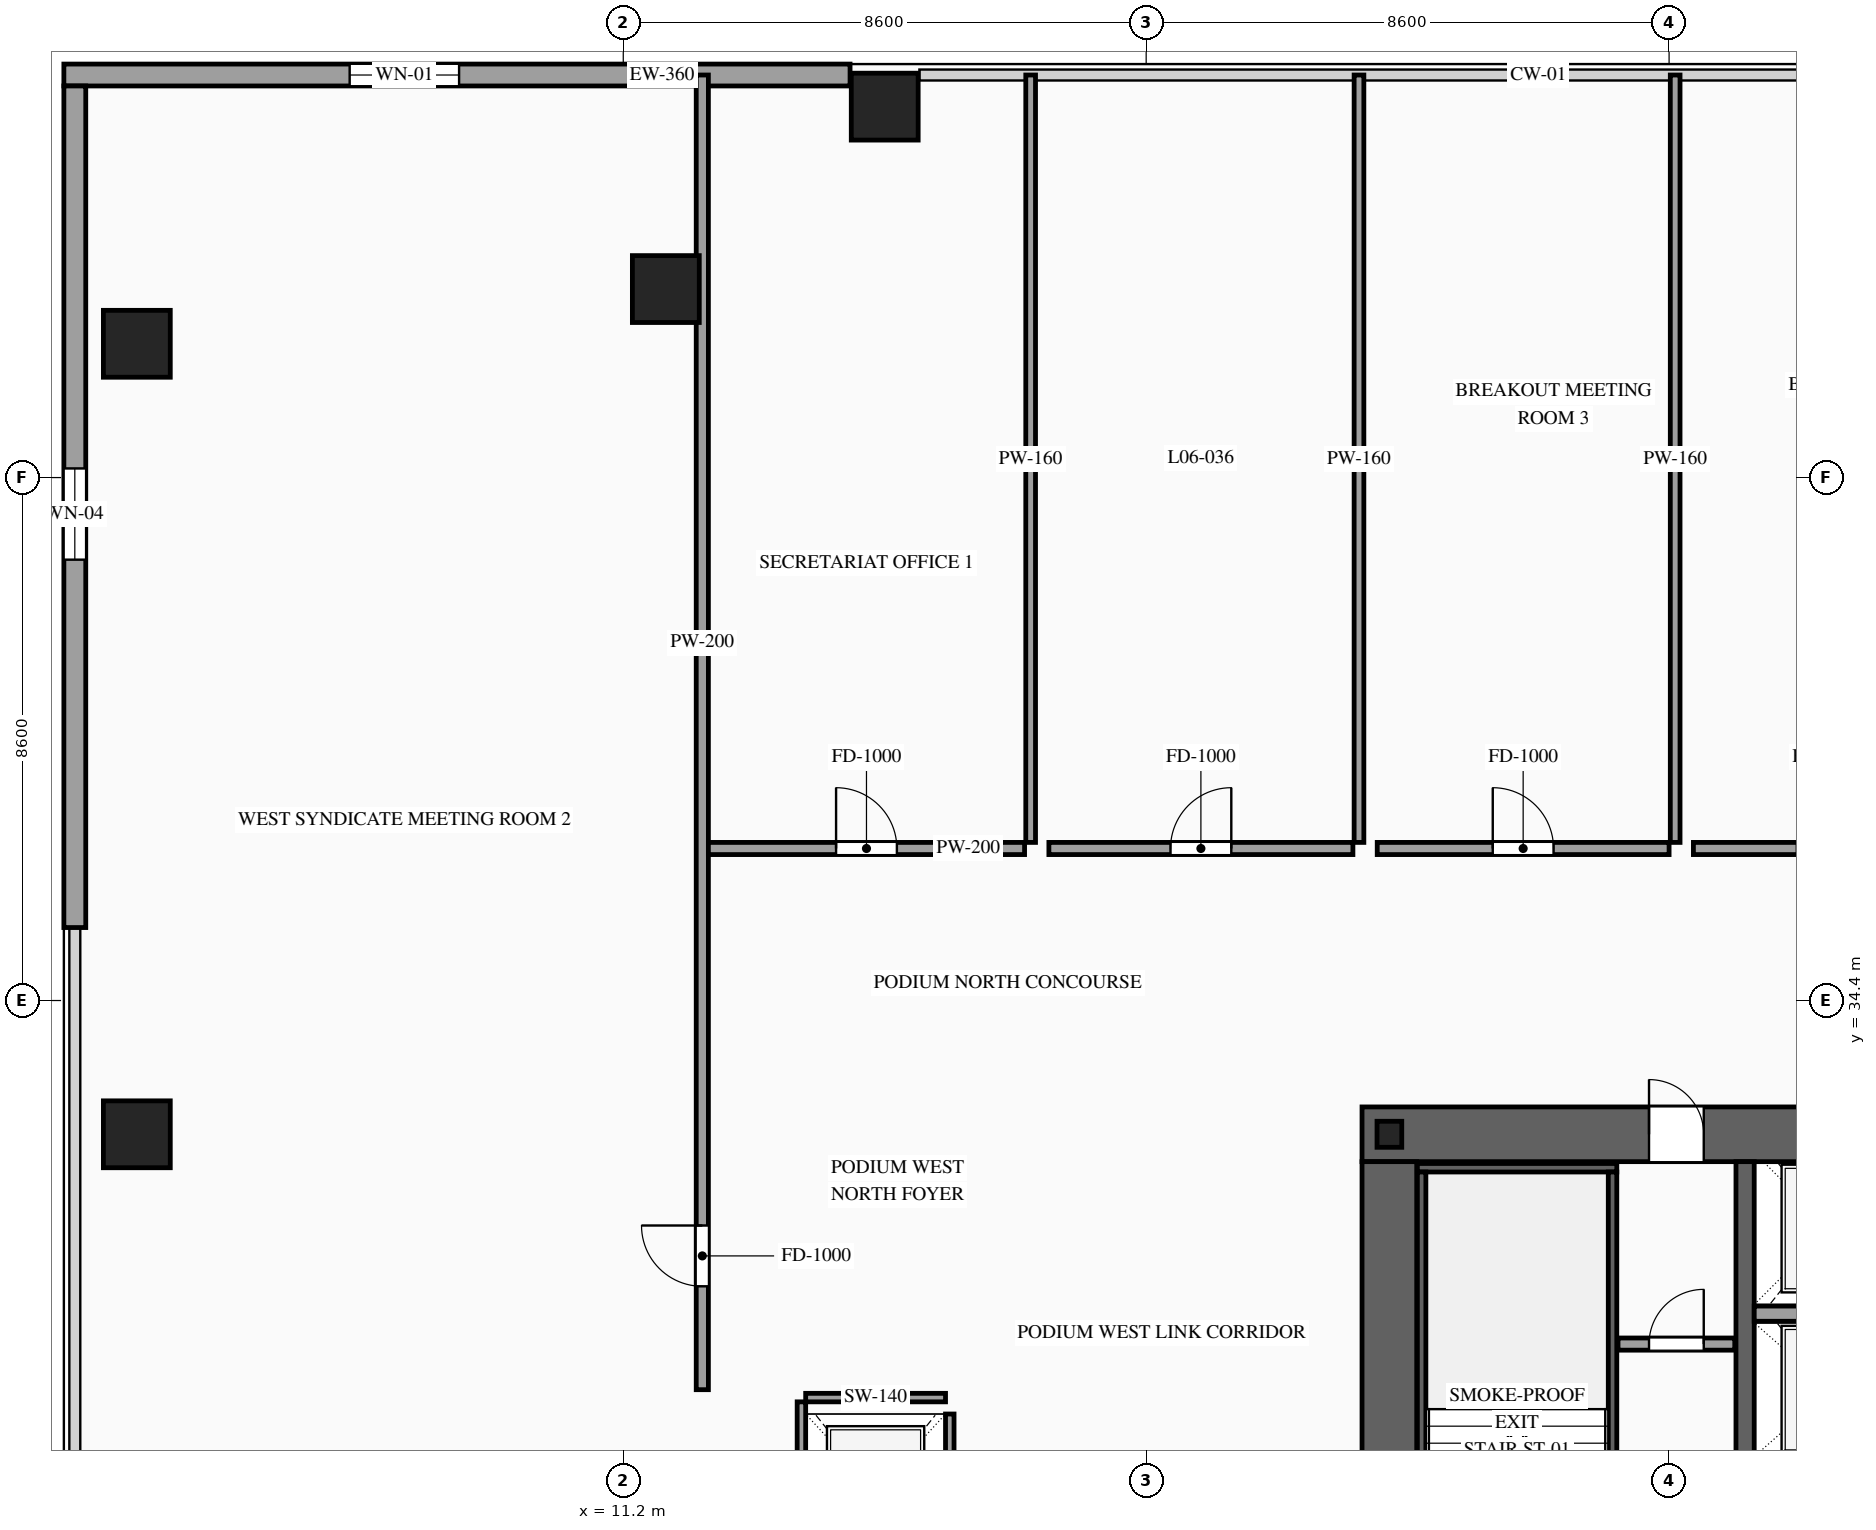
"""IFC4 building model, lengths in metres.
Left out: names, types, materials, properties, quantities, classifications, styles, units other than length and angle.
Written with IfcOpenShell. Run it as: python <this file> out.ifc"""

import sys

from ifc_helpers import new_model, si_unit, direction, frame, frame_2d, origin, origin_2d, place, context, subcontext, project, spatial, rectangle, i_section, extrude, source, transform, mapped, element, fill, save


model = new_model("IFC4")
c1 = context("Model", 3, precision=1e-05, world=origin(), true_north=direction((0.0, 1.0)))
c2 = subcontext(c1, "Body", "Model", "MODEL_VIEW")
j1 = project(units=[si_unit("LENGTHUNIT", "METRE"), si_unit("PLANEANGLEUNIT", "RADIAN")], contexts=[c1])
p1 = place(None, origin())
s1 = spatial("IfcSite", under=j1, at=p1, CompositionType="ELEMENT")
p2 = place(p1, origin())
s2 = spatial("IfcBuilding", under=s1, at=p2, CompositionType="ELEMENT")
p3 = place(p2, frame((0.0, 0.0, 25.8)))
s3 = spatial("IfcBuildingStorey", under=s2, at=p3, CompositionType="ELEMENT", Elevation=25.8)
p4 = place(p3, frame((23.35, 32.2, 0.0), z_axis=(0.0, 0.0, 1.0), x_axis=(1.0, 0.0, 0.0)))
e1 = element("IfcWall", 1, at=p4, inside=s3, PredefinedType="SHEAR", context=c2, shape_type="SweptSolid", body=[
    extrude(rectangle(XDim=27.3, YDim=0.9, at=frame_2d((13.65, 0.0))), origin(), (0.0, 0.0, 1.0), 4.8),
])
p5 = place(p4, frame((4.72, 0.0, 0.0)))
e2 = element("IfcOpeningElement", 2, at=p5, cuts=e1, PredefinedType="OPENING", context=c2, shape_type="SweptSolid", body=[
    extrude(rectangle(XDim=0.9, YDim=2.15, at=frame_2d((0.45, 1.075))), frame((0.0, 0.465, 0.0), z_axis=(0.0, -1.0, 0.0), x_axis=(1.0, 0.0, 0.0)), (0.0, 0.0, 1.0), 0.93),
])
p6 = place(p4, frame((10.0, 0.0, 0.0)))
e3 = element("IfcOpeningElement", 3, at=p6, cuts=e1, PredefinedType="OPENING", context=c2, shape_type="SweptSolid", body=[
    extrude(rectangle(XDim=1.1, YDim=2.2, at=frame_2d((0.55, 1.1))), frame((0.0, 0.465, 0.0), z_axis=(0.0, -1.0, 0.0), x_axis=(1.0, 0.0, 0.0)), (0.0, 0.0, 1.0), 0.93),
])
p7 = place(p4, frame((15.85, 0.0, 0.0)))
e4 = element("IfcOpeningElement", 4, at=p7, cuts=e1, PredefinedType="OPENING", context=c2, shape_type="SweptSolid", body=[
    extrude(rectangle(XDim=1.1, YDim=2.2, at=frame_2d((0.55, 1.1))), frame((0.0, 0.465, 0.0), z_axis=(0.0, -1.0, 0.0), x_axis=(1.0, 0.0, 0.0)), (0.0, 0.0, 1.0), 0.93),
])
p8 = place(p4, frame((18.38, 0.0, 0.0)))
e5 = element("IfcOpeningElement", 5, at=p8, cuts=e1, PredefinedType="OPENING", context=c2, shape_type="SweptSolid", body=[
    extrude(rectangle(XDim=0.9, YDim=2.15, at=frame_2d((0.45, 1.075))), frame((0.0, 0.465, 0.0), z_axis=(0.0, -1.0, 0.0), x_axis=(1.0, 0.0, 0.0)), (0.0, 0.0, 1.0), 0.93),
])
p9 = place(p4, frame((19.82, 0.0, 0.0)))
e6 = element("IfcOpeningElement", 6, at=p9, cuts=e1, PredefinedType="OPENING", context=c2, shape_type="SweptSolid", body=[
    extrude(rectangle(XDim=0.9, YDim=2.15, at=frame_2d((0.45, 1.075))), frame((0.0, 0.465, 0.0), z_axis=(0.0, -1.0, 0.0), x_axis=(1.0, 0.0, 0.0)), (0.0, 0.0, 1.0), 0.93),
])
m1 = source(origin(), c2, "Body", "SweptSolid", [
    extrude(rectangle(XDim=11.9, YDim=0.9, at=frame_2d((5.95, 0.0))), origin(), (0.0, 0.0, 1.0), 4.8),
])
p10 = place(p3, frame((23.8, 19.85, 0.0), z_axis=(0.0, 0.0, 1.0), x_axis=(0.0, 1.0, 0.0)))
e7 = element("IfcWall", 7, at=p10, inside=s3, PredefinedType="SHEAR", context=c2, shape_type="MappedRepresentation", body=[
    mapped(m1, transform((0.0, 0.0, 0.0), scale=1.0)),
])
m2 = source(origin(), c2, "Body", "SweptSolid", [
    extrude(rectangle(XDim=11.9, YDim=0.3, at=frame_2d((5.95, 0.0))), origin(), (0.0, 0.0, 1.0), 4.8),
])
p11 = place(p3, frame((29.65, 19.85, 0.0), z_axis=(0.0, 0.0, 1.0), x_axis=(0.0, 1.0, 0.0)))
e8 = element("IfcWall", 8, at=p11, inside=s3, PredefinedType="SOLIDWALL", context=c2, shape_type="MappedRepresentation", body=[
    mapped(m2, transform((0.0, 0.0, 0.0), scale=1.0)),
])
m3 = source(origin(), c2, "Body", "SweptSolid", [
    extrude(i_section(OverallWidth=0.407, OverallDepth=0.428, WebThickness=0.02, FlangeThickness=0.035, at=origin_2d()), origin(), (0.0, 0.0, 1.0), 4.8),
])
p12 = place(p3, frame((23.8, 32.2, 0.0), z_axis=(0.0, 0.0, 1.0), x_axis=(1.0, 0.0, 0.0)))
e9 = element("IfcColumn", 9, at=p12, inside=s3, PredefinedType="COLUMN", context=c2, shape_type="MappedRepresentation", body=[
    mapped(m3, transform((0.0, 0.0, 0.0), scale=1.0)),
])
m4 = source(origin(), c2, "Body", "SweptSolid", [
    extrude(rectangle(XDim=1.1, YDim=1.1, at=origin_2d()), origin(), (0.0, 0.0, 1.0), 4.8),
])
for number, where, z_axis, x_axis in (
    (10, (3.2, 32.2, 0.0), (0.0, 0.0, 1.0), (1.0, 0.0, 0.0)),
    (11, (3.2, 45.2, 0.0), (0.0, 0.0, 1.0), (1.0, 0.0, 0.0)),
    (12, (11.9, 46.1, 0.0), (0.0, 0.0, 1.0), (1.0, 0.0, 0.0)),
    (13, (15.5, 49.1, 0.0), (0.0, 0.0, 1.0), (1.0, 0.0, 0.0)),
):
    element("IfcColumn", number, at=place(p3, frame(where, z_axis=z_axis, x_axis=x_axis)), inside=s3, PredefinedType="COLUMN", context=c2, shape_type="MappedRepresentation", body=[
        mapped(m4, transform((0.0, 0.0, 0.0), scale=1.0)),
    ])
p13 = place(p3, frame((2.0, 49.62, 0.0), z_axis=(0.0, 0.0, 1.0), x_axis=(1.0, 0.0, 0.0)))
e14 = element("IfcWall", 14, at=p13, inside=s3, PredefinedType="SOLIDWALL", context=c2, shape_type="SweptSolid", body=[
    extrude(rectangle(XDim=12.93, YDim=0.36, at=frame_2d((6.465, 0.0))), origin(), (0.0, 0.0, 1.0), 4.5),
])
p14 = place(p13, frame((4.7, 0.0, 0.9)))
e15 = element("IfcOpeningElement", 15, at=p14, cuts=e14, PredefinedType="OPENING", context=c2, shape_type="SweptSolid", body=[
    extrude(rectangle(XDim=1.8, YDim=2.2, at=frame_2d((0.9, 1.1))), frame((0.0, 0.195, 0.0), z_axis=(0.0, -1.0, 0.0), x_axis=(1.0, 0.0, 0.0)), (0.0, 0.0, 1.0), 0.39),
])
p15 = place(p3, frame((2.18, 35.6, 0.0), z_axis=(0.0, 0.0, 1.0), x_axis=(0.0, 1.0, 0.0)))
e16 = element("IfcWall", 16, at=p15, inside=s3, PredefinedType="SOLIDWALL", context=c2, shape_type="SweptSolid", body=[
    extrude(rectangle(XDim=13.84, YDim=0.36, at=frame_2d((6.92, 0.0))), origin(), (0.0, 0.0, 1.0), 4.5),
])
p16 = place(p15, frame((6.05, 0.0, 0.9)))
e17 = element("IfcOpeningElement", 17, at=p16, cuts=e16, PredefinedType="OPENING", context=c2, shape_type="SweptSolid", body=[
    extrude(rectangle(XDim=1.5, YDim=1.8, at=frame_2d((0.75, 0.9))), frame((0.0, 0.195, 0.0), z_axis=(0.0, -1.0, 0.0), x_axis=(1.0, 0.0, 0.0)), (0.0, 0.0, 1.0), 0.39),
])
m5 = source(origin(), c2, "Body", "SweptSolid", [
    extrude(rectangle(XDim=2.5, YDim=0.25, at=frame_2d((1.25, 0.0))), origin(), (0.0, 0.0, 1.0), 4.5),
])
p17 = place(p3, frame((29.8, 29.25, 0.0), z_axis=(0.0, 0.0, 1.0), x_axis=(1.0, 0.0, 0.0)))
e18 = element("IfcWall", 18, at=p17, inside=s3, PredefinedType="SOLIDWALL", context=c2, shape_type="MappedRepresentation", body=[
    mapped(m5, transform((0.0, 0.0, 0.0), scale=1.0)),
])
m6 = source(origin(), c2, "Body", "SweptSolid", [
    extrude(rectangle(XDim=5.8, YDim=0.14, at=frame_2d((2.9, 0.0))), origin(), (0.0, 0.0, 1.0), 4.5),
])
p18 = place(p3, frame((14.13, 22.0, 0.0), z_axis=(0.0, 0.0, 1.0), x_axis=(0.0, 1.0, 0.0)))
e19 = element("IfcWall", 19, at=p18, inside=s3, PredefinedType="SOLIDWALL", context=c2, shape_type="MappedRepresentation", body=[
    mapped(m6, transform((0.0, 0.0, 0.0), scale=1.0)),
])
p19 = place(p3, frame((16.57, 25.1, 0.0), z_axis=(0.0, 0.0, 1.0), x_axis=(0.0, 1.0, 0.0)))
e20 = element("IfcWall", 20, at=p19, inside=s3, PredefinedType="SOLIDWALL", context=c2, shape_type="SweptSolid", body=[
    extrude(rectangle(XDim=2.5, YDim=0.14, at=frame_2d((1.25, 0.0))), origin(), (0.0, 0.0, 1.0), 4.5),
])
p20 = place(p19, frame((0.7, 0.0, 0.0)))
e21 = element("IfcOpeningElement", 21, at=p20, cuts=e20, PredefinedType="OPENING", context=c2, shape_type="SweptSolid", body=[
    extrude(rectangle(XDim=1.1, YDim=2.2, at=frame_2d((0.55, 1.1))), frame((0.0, 0.085, 0.0), z_axis=(0.0, -1.0, 0.0), x_axis=(1.0, 0.0, 0.0)), (0.0, 0.0, 1.0), 0.17),
])
m7 = source(origin(), c2, "Body", "SweptSolid", [
    extrude(rectangle(XDim=2.3, YDim=0.14, at=frame_2d((1.15, 0.0))), origin(), (0.0, 0.0, 1.0), 4.5),
])
p21 = place(p3, frame((14.2, 27.87, 0.0), z_axis=(0.0, 0.0, 1.0), x_axis=(1.0, 0.0, 0.0)))
e22 = element("IfcWall", 22, at=p21, inside=s3, PredefinedType="SOLIDWALL", context=c2, shape_type="MappedRepresentation", body=[
    mapped(m7, transform((0.0, 0.0, 0.0), scale=1.0)),
])
m8 = source(origin(), c2, "Body", "SweptSolid", [
    extrude(rectangle(XDim=3.28, YDim=0.14, at=frame_2d((1.64, 0.0))), origin(), (0.0, 0.0, 1.0), 4.5),
])
p22 = place(p3, frame((24.26, 31.65, 0.0), z_axis=(0.0, 0.0, 1.0), x_axis=(1.0, 0.0, 0.0)))
e23 = element("IfcWall", 23, at=p22, inside=s3, PredefinedType="SOLIDWALL", context=c2, shape_type="MappedRepresentation", body=[
    mapped(m8, transform((0.0, 0.0, 0.0), scale=1.0)),
])
m9 = source(origin(), c2, "Body", "SweptSolid", [
    extrude(rectangle(XDim=8.94, YDim=0.14, at=frame_2d((4.47, 0.0))), origin(), (0.0, 0.0, 1.0), 4.5),
])
for number, where, z_axis, x_axis in (
    (24, (24.33, 22.64, 0.0), (0.0, 0.0, 1.0), (0.0, 1.0, 0.0)),
    (25, (27.47, 22.64, 0.0), (0.0, 0.0, 1.0), (0.0, 1.0, 0.0)),
):
    element("IfcWall", number, at=place(p3, frame(where, z_axis=z_axis, x_axis=x_axis)), inside=s3, PredefinedType="SOLIDWALL", context=c2, shape_type="MappedRepresentation", body=[
        mapped(m9, transform((0.0, 0.0, 0.0), scale=1.0)),
    ])
p23 = place(p3, frame((27.56, 28.75, 0.0), z_axis=(0.0, 0.0, 1.0), x_axis=(1.0, 0.0, 0.0)))
e26 = element("IfcWall", 26, at=p23, inside=s3, PredefinedType="PARTITIONING", context=c2, shape_type="SweptSolid", body=[
    extrude(rectangle(XDim=1.92, YDim=0.2, at=frame_2d((0.96, 0.0))), origin(), (0.0, 0.0, 1.0), 4.5),
])
p24 = place(p23, frame((0.51, 0.0, 0.0)))
e27 = element("IfcOpeningElement", 27, at=p24, cuts=e26, PredefinedType="OPENING", context=c2, shape_type="SweptSolid", body=[
    extrude(rectangle(XDim=0.9, YDim=2.15, at=frame_2d((0.45, 1.075))), frame((0.0, 0.115, 0.0), z_axis=(0.0, -1.0, 0.0), x_axis=(1.0, 0.0, 0.0)), (0.0, 0.0, 1.0), 0.23),
])
p25 = place(p3, frame((12.5, 28.0, 0.0), z_axis=(0.0, 0.0, 1.0), x_axis=(0.0, 1.0, 0.0)))
e28 = element("IfcWall", 28, at=p25, inside=s3, PredefinedType="PARTITIONING", context=c2, shape_type="SweptSolid", body=[
    extrude(rectangle(XDim=21.62, YDim=0.2, at=frame_2d((10.81, 0.0))), origin(), (0.0, 0.0, 1.0), 4.5),
])
p26 = place(p25, frame((1.7, 0.0, 0.0)))
e29 = element("IfcOpeningElement", 29, at=p26, cuts=e28, PredefinedType="OPENING", context=c2, shape_type="SweptSolid", body=[
    extrude(rectangle(XDim=1.0, YDim=2.2, at=frame_2d((0.5, 1.1))), frame((0.0, 0.115, 0.0), z_axis=(0.0, -1.0, 0.0), x_axis=(1.0, 0.0, 0.0)), (0.0, 0.0, 1.0), 0.23),
])
p27 = place(p3, frame((12.6, 36.9, 0.0), z_axis=(0.0, 0.0, 1.0), x_axis=(1.0, 0.0, 0.0)))
e30 = element("IfcWall", 30, at=p27, inside=s3, PredefinedType="PARTITIONING", context=c2, shape_type="SweptSolid", body=[
    extrude(rectangle(XDim=5.2, YDim=0.2, at=frame_2d((2.6, 0.0))), origin(), (0.0, 0.0, 1.0), 4.5),
])
p28 = place(p27, frame((2.1, 0.0, 0.0)))
e31 = element("IfcOpeningElement", 31, at=p28, cuts=e30, PredefinedType="OPENING", context=c2, shape_type="SweptSolid", body=[
    extrude(rectangle(XDim=1.0, YDim=2.2, at=frame_2d((0.5, 1.1))), frame((0.0, 0.115, 0.0), z_axis=(0.0, -1.0, 0.0), x_axis=(1.0, 0.0, 0.0)), (0.0, 0.0, 1.0), 0.23),
])
m10 = source(origin(), c2, "Body", "SweptSolid", [
    extrude(rectangle(XDim=12.62, YDim=0.16, at=frame_2d((6.31, 0.0))), origin(), (0.0, 0.0, 1.0), 4.5),
])
p29 = place(p3, frame((17.9, 37.0, 0.0), z_axis=(0.0, 0.0, 1.0), x_axis=(0.0, 1.0, 0.0)))
e32 = element("IfcWall", 32, at=p29, inside=s3, PredefinedType="PARTITIONING", context=c2, shape_type="MappedRepresentation", body=[
    mapped(m10, transform((0.0, 0.0, 0.0), scale=1.0)),
])
p30 = place(p3, frame((18.2, 36.9, 0.0), z_axis=(0.0, 0.0, 1.0), x_axis=(1.0, 0.0, 0.0)))
e33 = element("IfcWall", 33, at=p30, inside=s3, PredefinedType="PARTITIONING", context=c2, shape_type="SweptSolid", body=[
    extrude(rectangle(XDim=5.0, YDim=0.2, at=frame_2d((2.5, 0.0))), origin(), (0.0, 0.0, 1.0), 4.5),
])
p31 = place(p30, frame((2.0, 0.0, 0.0)))
e34 = element("IfcOpeningElement", 34, at=p31, cuts=e33, PredefinedType="OPENING", context=c2, shape_type="SweptSolid", body=[
    extrude(rectangle(XDim=1.0, YDim=2.2, at=frame_2d((0.5, 1.1))), frame((0.0, 0.115, 0.0), z_axis=(0.0, -1.0, 0.0), x_axis=(1.0, 0.0, 0.0)), (0.0, 0.0, 1.0), 0.23),
])
p32 = place(p3, frame((23.3, 37.0, 0.0), z_axis=(0.0, 0.0, 1.0), x_axis=(0.0, 1.0, 0.0)))
e35 = element("IfcWall", 35, at=p32, inside=s3, PredefinedType="PARTITIONING", context=c2, shape_type="MappedRepresentation", body=[
    mapped(m10, transform((0.0, 0.0, 0.0), scale=1.0)),
])
p33 = place(p3, frame((23.6, 36.9, 0.0), z_axis=(0.0, 0.0, 1.0), x_axis=(1.0, 0.0, 0.0)))
e36 = element("IfcWall", 36, at=p33, inside=s3, PredefinedType="PARTITIONING", context=c2, shape_type="SweptSolid", body=[
    extrude(rectangle(XDim=4.8, YDim=0.2, at=frame_2d((2.4, 0.0))), origin(), (0.0, 0.0, 1.0), 4.5),
])
p34 = place(p33, frame((1.9, 0.0, 0.0)))
e37 = element("IfcOpeningElement", 37, at=p34, cuts=e36, PredefinedType="OPENING", context=c2, shape_type="SweptSolid", body=[
    extrude(rectangle(XDim=1.0, YDim=2.2, at=frame_2d((0.5, 1.1))), frame((0.0, 0.115, 0.0), z_axis=(0.0, -1.0, 0.0), x_axis=(1.0, 0.0, 0.0)), (0.0, 0.0, 1.0), 0.23),
])
p35 = place(p3, frame((28.5, 37.0, 0.0), z_axis=(0.0, 0.0, 1.0), x_axis=(0.0, 1.0, 0.0)))
e38 = element("IfcWall", 38, at=p35, inside=s3, PredefinedType="PARTITIONING", context=c2, shape_type="MappedRepresentation", body=[
    mapped(m10, transform((0.0, 0.0, 0.0), scale=1.0)),
])
p36 = place(p3, frame((28.8, 36.9, 0.0), z_axis=(0.0, 0.0, 1.0), x_axis=(1.0, 0.0, 0.0)))
e39 = element("IfcWall", 39, at=p36, inside=s3, PredefinedType="PARTITIONING", context=c2, shape_type="SweptSolid", body=[
    extrude(rectangle(XDim=4.4, YDim=0.2, at=frame_2d((2.2, 0.0))), origin(), (0.0, 0.0, 1.0), 4.5),
])
p37 = place(p36, frame((1.7, 0.0, 0.0)))
e40 = element("IfcOpeningElement", 40, at=p37, cuts=e39, PredefinedType="OPENING", context=c2, shape_type="SweptSolid", body=[
    extrude(rectangle(XDim=1.0, YDim=2.2, at=frame_2d((0.5, 1.1))), frame((0.0, 0.115, 0.0), z_axis=(0.0, -1.0, 0.0), x_axis=(1.0, 0.0, 0.0)), (0.0, 0.0, 1.0), 0.23),
])
m11 = source(origin(), c2, "Body", "SweptSolid", [
    extrude(rectangle(XDim=1.8, YDim=2.2, at=frame_2d((0.9, 1.1))), frame((0.0, 0.03, 0.0), z_axis=(0.0, -1.0, 0.0), x_axis=(1.0, 0.0, 0.0)), (0.0, 0.0, 1.0), 0.06),
])
p38 = place(p14, origin())
e41 = element("IfcWindow", 41, at=p38, inside=s3, PartitioningType="SINGLE_PANEL", PredefinedType="WINDOW", context=c2, shape_type="MappedRepresentation", body=[
    mapped(m11, transform((0.0, 0.0, 0.0), scale=1.0)),
])
fill(e15, e41)
m12 = source(origin(), c2, "Body", "SweptSolid", [
    extrude(rectangle(XDim=1.5, YDim=1.8, at=frame_2d((0.75, 0.9))), frame((0.0, 0.03, 0.0), z_axis=(0.0, -1.0, 0.0), x_axis=(1.0, 0.0, 0.0)), (0.0, 0.0, 1.0), 0.06),
])
p39 = place(p16, origin())
e42 = element("IfcWindow", 42, at=p39, inside=s3, PartitioningType="SINGLE_PANEL", PredefinedType="WINDOW", context=c2, shape_type="MappedRepresentation", body=[
    mapped(m12, transform((0.0, 0.0, 0.0), scale=1.0)),
])
fill(e17, e42)
m13 = source(origin(), c2, "Body", "SweptSolid", [
    extrude(rectangle(XDim=0.9, YDim=2.15, at=frame_2d((0.45, 1.075))), frame((0.0, 0.025, 0.0), z_axis=(0.0, -1.0, 0.0), x_axis=(1.0, 0.0, 0.0)), (0.0, 0.0, 1.0), 0.05),
])
p40 = place(p5, origin())
e43 = element("IfcDoor", 43, at=p40, inside=s3, OperationType="SINGLE_SWING_LEFT", PredefinedType="DOOR", context=c2, shape_type="MappedRepresentation", body=[
    mapped(m13, transform((0.0, 0.0, 0.0), scale=1.0)),
])
fill(e2, e43)
p41 = place(p24, origin())
e44 = element("IfcDoor", 44, at=p41, inside=s3, OperationType="SINGLE_SWING_RIGHT", PredefinedType="DOOR", context=c2, shape_type="MappedRepresentation", body=[
    mapped(m13, transform((0.0, 0.0, 0.0), scale=1.0)),
])
fill(e27, e44)
m14 = source(origin(), c2, "Body", "SweptSolid", [
    extrude(rectangle(XDim=1.0, YDim=2.2, at=frame_2d((0.5, 1.1))), frame((0.0, 0.025, 0.0), z_axis=(0.0, -1.0, 0.0), x_axis=(1.0, 0.0, 0.0)), (0.0, 0.0, 1.0), 0.05),
])
p42 = place(p26, origin())
e45 = element("IfcDoor", 45, at=p42, inside=s3, OperationType="SINGLE_SWING_RIGHT", PredefinedType="DOOR", context=c2, shape_type="MappedRepresentation", body=[
    mapped(m14, transform((0.0, 0.0, 0.0), scale=1.0)),
])
fill(e29, e45)
p43 = place(p28, origin())
e46 = element("IfcDoor", 46, at=p43, inside=s3, OperationType="SINGLE_SWING_LEFT", PredefinedType="DOOR", context=c2, shape_type="MappedRepresentation", body=[
    mapped(m14, transform((0.0, 0.0, 0.0), scale=1.0)),
])
fill(e31, e46)
p44 = place(p31, origin())
e47 = element("IfcDoor", 47, at=p44, inside=s3, OperationType="SINGLE_SWING_RIGHT", PredefinedType="DOOR", context=c2, shape_type="MappedRepresentation", body=[
    mapped(m14, transform((0.0, 0.0, 0.0), scale=1.0)),
])
fill(e34, e47)
p45 = place(p34, origin())
e48 = element("IfcDoor", 48, at=p45, inside=s3, OperationType="SINGLE_SWING_LEFT", PredefinedType="DOOR", context=c2, shape_type="MappedRepresentation", body=[
    mapped(m14, transform((0.0, 0.0, 0.0), scale=1.0)),
])
fill(e37, e48)
save(model, sys.argv[1])
